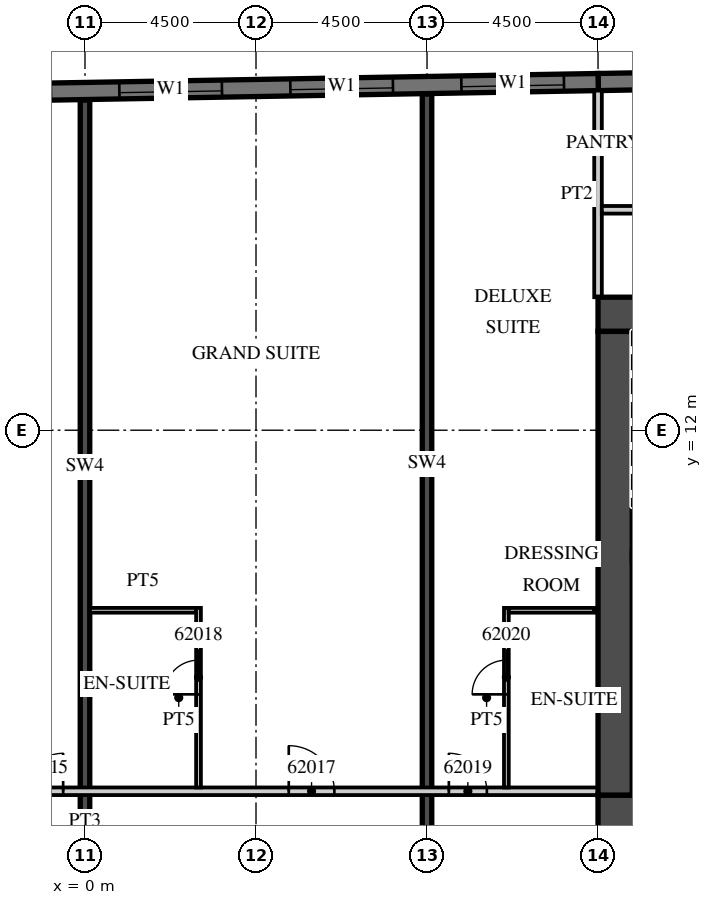
"""IFC4 building model, lengths in metres.
Left out: names, types, materials, properties, quantities, classifications, styles, units other than length and angle.
Written with IfcOpenShell. Run it as: python <this file> out.ifc"""

import sys

from ifc_helpers import new_model, si_unit, direction, frame, frame_2d, origin, place, context, subcontext, project, spatial, rectangle, extrude, element, fill, save


model = new_model("IFC4")
c1 = context("Model", 3, precision=1e-05, world=origin(), true_north=direction((0.0, 1.0)))
c2 = subcontext(c1, "Body", "Model", "MODEL_VIEW")
j1 = project(units=[si_unit("LENGTHUNIT", "METRE"), si_unit("PLANEANGLEUNIT", "RADIAN")], contexts=[c1])
p1 = place(None, origin())
s1 = spatial("IfcSite", under=j1, at=p1, CompositionType="ELEMENT")
p2 = place(p1, origin())
s2 = spatial("IfcBuilding", under=s1, at=p2, CompositionType="ELEMENT")
p3 = place(p2, frame((0.0, 0.0, 250.7)))
s3 = spatial("IfcBuildingStorey", under=s2, at=p3, CompositionType="ELEMENT", Elevation=250.7)
p4 = place(p3, frame((0.0, 1.4, 0.0), z_axis=(0.0, 0.0, 1.0), x_axis=(0.0, 1.0, 0.0)))
e1 = element("IfcWall", 1, at=p4, inside=s3, PredefinedType="SHEAR", context=c2, shape_type="SweptSolid", body=[
    extrude(rectangle(XDim=19.289, YDim=0.25, at=frame_2d((9.644, 0.0))), origin(), (0.0, 0.0, 1.0), 3.3),
])
p5 = place(p3, frame((9.0, 1.4, 0.0), z_axis=(0.0, 0.0, 1.0), x_axis=(0.0, 1.0, 0.0)))
e2 = element("IfcWall", 2, at=p5, inside=s3, PredefinedType="SHEAR", context=c2, shape_type="SweptSolid", body=[
    extrude(rectangle(XDim=19.446, YDim=0.25, at=frame_2d((9.723, 0.0))), origin(), (0.0, 0.0, 1.0), 3.3),
])
p6 = place(p3, frame((31.504, 21.476, 0.0), z_axis=(0.0, 0.0, 1.0), x_axis=(-0.999847677887, -0.017453395744, 0.0)))
e3 = element("IfcWall", 3, at=p6, inside=s3, PredefinedType="SOLIDWALL", context=c2, shape_type="SweptSolid", body=[
    extrude(rectangle(XDim=18.003, YDim=0.45, at=frame_2d((9.001, 0.0))), origin(), (0.0, 0.0, 1.0), 3.02),
])
p7 = place(p3, frame((13.504, 21.161, 0.0), z_axis=(0.0, 0.0, 1.0), x_axis=(-0.999847763257, -0.017448504532, 0.0)))
e4 = element("IfcWall", 4, at=p7, inside=s3, PredefinedType="SOLIDWALL", context=c2, shape_type="SweptSolid", body=[
    extrude(rectangle(XDim=46.859, YDim=0.45, at=frame_2d((23.43, 0.0))), origin(), (0.0, 0.0, 1.0), 3.02),
])
p8 = place(p7, frame((0.9, 0.0, 0.45)))
e5 = element("IfcOpeningElement", 5, at=p8, cuts=e4, PredefinedType="OPENING", context=c2, shape_type="SweptSolid", body=[
    extrude(rectangle(XDim=2.7, YDim=2.25, at=frame_2d((1.35, 1.125))), frame((0.0, 0.235, 0.0), z_axis=(0.0, -1.0, 0.0), x_axis=(1.0, 0.0, 0.0)), (0.0, 0.0, 1.0), 0.47),
])
p9 = place(p7, frame((5.401, 0.0, 0.45)))
e6 = element("IfcOpeningElement", 6, at=p9, cuts=e4, PredefinedType="OPENING", context=c2, shape_type="SweptSolid", body=[
    extrude(rectangle(XDim=2.7, YDim=2.25, at=frame_2d((1.35, 1.125))), frame((0.0, 0.235, 0.0), z_axis=(0.0, -1.0, 0.0), x_axis=(1.0, 0.0, 0.0)), (0.0, 0.0, 1.0), 0.47),
])
p10 = place(p7, frame((9.902, 0.0, 0.45)))
e7 = element("IfcOpeningElement", 7, at=p10, cuts=e4, PredefinedType="OPENING", context=c2, shape_type="SweptSolid", body=[
    extrude(rectangle(XDim=2.7, YDim=2.25, at=frame_2d((1.35, 1.125))), frame((0.0, 0.235, 0.0), z_axis=(0.0, -1.0, 0.0), x_axis=(1.0, 0.0, 0.0)), (0.0, 0.0, 1.0), 0.47),
])
p11 = place(p7, frame((14.402, 0.0, 0.45)))
e8 = element("IfcOpeningElement", 8, at=p11, cuts=e4, PredefinedType="OPENING", context=c2, shape_type="SweptSolid", body=[
    extrude(rectangle(XDim=2.7, YDim=2.25, at=frame_2d((1.35, 1.125))), frame((0.0, 0.235, 0.0), z_axis=(0.0, -1.0, 0.0), x_axis=(1.0, 0.0, 0.0)), (0.0, 0.0, 1.0), 0.47),
])
p12 = place(p7, frame((18.903, 0.0, 0.45)))
e9 = element("IfcOpeningElement", 9, at=p12, cuts=e4, PredefinedType="OPENING", context=c2, shape_type="SweptSolid", body=[
    extrude(rectangle(XDim=2.7, YDim=2.25, at=frame_2d((1.35, 1.125))), frame((0.0, 0.235, 0.0), z_axis=(0.0, -1.0, 0.0), x_axis=(1.0, 0.0, 0.0)), (0.0, 0.0, 1.0), 0.47),
])
p13 = place(p7, frame((23.404, 0.0, 0.45)))
e10 = element("IfcOpeningElement", 10, at=p13, cuts=e4, PredefinedType="OPENING", context=c2, shape_type="SweptSolid", body=[
    extrude(rectangle(XDim=2.7, YDim=2.25, at=frame_2d((1.35, 1.125))), frame((0.0, 0.235, 0.0), z_axis=(0.0, -1.0, 0.0), x_axis=(1.0, 0.0, 0.0)), (0.0, 0.0, 1.0), 0.47),
])
p14 = place(p7, frame((27.904, 0.0, 0.45)))
e11 = element("IfcOpeningElement", 11, at=p14, cuts=e4, PredefinedType="OPENING", context=c2, shape_type="SweptSolid", body=[
    extrude(rectangle(XDim=2.7, YDim=2.25, at=frame_2d((1.35, 1.125))), frame((0.0, 0.235, 0.0), z_axis=(0.0, -1.0, 0.0), x_axis=(1.0, 0.0, 0.0)), (0.0, 0.0, 1.0), 0.47),
])
p15 = place(p7, frame((32.405, 0.0, 0.45)))
e12 = element("IfcOpeningElement", 12, at=p15, cuts=e4, PredefinedType="OPENING", context=c2, shape_type="SweptSolid", body=[
    extrude(rectangle(XDim=2.7, YDim=2.25, at=frame_2d((1.35, 1.125))), frame((0.0, 0.235, 0.0), z_axis=(0.0, -1.0, 0.0), x_axis=(1.0, 0.0, 0.0)), (0.0, 0.0, 1.0), 0.47),
])
p16 = place(p7, frame((36.906, 0.0, 0.45)))
e13 = element("IfcOpeningElement", 13, at=p16, cuts=e4, PredefinedType="OPENING", context=c2, shape_type="SweptSolid", body=[
    extrude(rectangle(XDim=2.7, YDim=2.25, at=frame_2d((1.35, 1.125))), frame((0.0, 0.235, 0.0), z_axis=(0.0, -1.0, 0.0), x_axis=(1.0, 0.0, 0.0)), (0.0, 0.0, 1.0), 0.47),
])
p17 = place(p7, frame((41.406, 0.0, 0.45)))
e14 = element("IfcOpeningElement", 14, at=p17, cuts=e4, PredefinedType="OPENING", context=c2, shape_type="SweptSolid", body=[
    extrude(rectangle(XDim=2.7, YDim=2.25, at=frame_2d((1.35, 1.125))), frame((0.0, 0.235, 0.0), z_axis=(0.0, -1.0, 0.0), x_axis=(1.0, 0.0, 0.0)), (0.0, 0.0, 1.0), 0.47),
])
p18 = place(p3, frame((13.5, 15.5, 0.0), z_axis=(0.0, 0.0, 1.0), x_axis=(0.0, 1.0, 0.0)))
e15 = element("IfcWall", 15, at=p18, inside=s3, PredefinedType="PARTITIONING", context=c2, shape_type="SweptSolid", body=[
    extrude(rectangle(XDim=5.436, YDim=0.2, at=frame_2d((2.718, 0.0))), origin(), (0.0, 0.0, 1.0), 3.02),
])
p19 = place(p3, frame((-13.5, 2.5, 0.0), z_axis=(0.0, 0.0, 1.0), x_axis=(1.0, 0.0, 0.0)))
e16 = element("IfcWall", 16, at=p19, inside=s3, PredefinedType="PARTITIONING", context=c2, shape_type="SweptSolid", body=[
    extrude(rectangle(XDim=27.0, YDim=0.2, at=frame_2d((13.5, 0.0))), origin(), (0.0, 0.0, 1.0), 3.02),
])
p20 = place(p19, frame((0.575, 0.0, 0.0)))
e17 = element("IfcOpeningElement", 17, at=p20, cuts=e16, PredefinedType="OPENING", context=c2, shape_type="SweptSolid", body=[
    extrude(rectangle(XDim=1.0, YDim=2.1, at=frame_2d((0.5, 1.05))), frame((0.0, 0.11, 0.0), z_axis=(0.0, -1.0, 0.0), x_axis=(1.0, 0.0, 0.0)), (0.0, 0.0, 1.0), 0.22),
])
p21 = place(p19, frame((7.45, 0.0, 0.0)))
e18 = element("IfcOpeningElement", 18, at=p21, cuts=e16, PredefinedType="OPENING", context=c2, shape_type="SweptSolid", body=[
    extrude(rectangle(XDim=1.0, YDim=2.1, at=frame_2d((0.5, 1.05))), frame((0.0, 0.11, 0.0), z_axis=(0.0, -1.0, 0.0), x_axis=(1.0, 0.0, 0.0)), (0.0, 0.0, 1.0), 0.22),
])
p22 = place(p19, frame((11.925, 0.0, 0.0)))
e19 = element("IfcOpeningElement", 19, at=p22, cuts=e16, PredefinedType="OPENING", context=c2, shape_type="SweptSolid", body=[
    extrude(rectangle(XDim=1.0, YDim=2.1, at=frame_2d((0.5, 1.05))), frame((0.0, 0.11, 0.0), z_axis=(0.0, -1.0, 0.0), x_axis=(1.0, 0.0, 0.0)), (0.0, 0.0, 1.0), 0.22),
])
p23 = place(p19, frame((18.862, 0.0, 0.0)))
e20 = element("IfcOpeningElement", 20, at=p23, cuts=e16, PredefinedType="OPENING", context=c2, shape_type="SweptSolid", body=[
    extrude(rectangle(XDim=1.2, YDim=2.1, at=frame_2d((0.6, 1.05))), frame((0.0, 0.11, 0.0), z_axis=(0.0, -1.0, 0.0), x_axis=(1.0, 0.0, 0.0)), (0.0, 0.0, 1.0), 0.22),
])
p24 = place(p19, frame((23.075, 0.0, 0.0)))
e21 = element("IfcOpeningElement", 21, at=p24, cuts=e16, PredefinedType="OPENING", context=c2, shape_type="SweptSolid", body=[
    extrude(rectangle(XDim=1.0, YDim=2.1, at=frame_2d((0.5, 1.05))), frame((0.0, 0.11, 0.0), z_axis=(0.0, -1.0, 0.0), x_axis=(1.0, 0.0, 0.0)), (0.0, 0.0, 1.0), 0.22),
])
p25 = place(p3, frame((2.987, 2.6, 0.0), z_axis=(0.0, 0.0, 1.0), x_axis=(0.0, 1.0, 0.0)))
e22 = element("IfcWall", 22, at=p25, inside=s3, PredefinedType="PARTITIONING", context=c2, shape_type="SweptSolid", body=[
    extrude(rectangle(XDim=4.725, YDim=0.125, at=frame_2d((2.362, 0.0))), origin(), (0.0, 0.0, 1.0), 3.02),
])
p26 = place(p25, frame((2.45, 0.0, 0.0)))
e23 = element("IfcOpeningElement", 23, at=p26, cuts=e22, PredefinedType="OPENING", context=c2, shape_type="SweptSolid", body=[
    extrude(rectangle(XDim=0.9, YDim=2.1, at=frame_2d((0.45, 1.05))), frame((0.0, 0.073, 0.0), z_axis=(0.0, -1.0, 0.0), x_axis=(1.0, 0.0, 0.0)), (0.0, 0.0, 1.0), 0.145),
])
p27 = place(p3, frame((0.125, 7.262, 0.0), z_axis=(0.0, 0.0, 1.0), x_axis=(1.0, 0.0, 0.0)))
e24 = element("IfcWall", 24, at=p27, inside=s3, PredefinedType="PARTITIONING", context=c2, shape_type="SweptSolid", body=[
    extrude(rectangle(XDim=2.8, YDim=0.125, at=frame_2d((1.4, 0.0))), origin(), (0.0, 0.0, 1.0), 3.02),
])
p28 = place(p3, frame((11.088, 2.6, 0.0), z_axis=(0.0, 0.0, 1.0), x_axis=(0.0, 1.0, 0.0)))
e25 = element("IfcWall", 25, at=p28, inside=s3, PredefinedType="PARTITIONING", context=c2, shape_type="SweptSolid", body=[
    extrude(rectangle(XDim=4.725, YDim=0.125, at=frame_2d((2.362, 0.0))), origin(), (0.0, 0.0, 1.0), 3.02),
])
p29 = place(p28, frame((2.45, 0.0, 0.0)))
e26 = element("IfcOpeningElement", 26, at=p29, cuts=e25, PredefinedType="OPENING", context=c2, shape_type="SweptSolid", body=[
    extrude(rectangle(XDim=0.9, YDim=2.1, at=frame_2d((0.45, 1.05))), frame((0.0, 0.073, 0.0), z_axis=(0.0, -1.0, 0.0), x_axis=(1.0, 0.0, 0.0)), (0.0, 0.0, 1.0), 0.145),
])
p30 = place(p3, frame((11.15, 7.262, 0.0), z_axis=(0.0, 0.0, 1.0), x_axis=(1.0, 0.0, 0.0)))
e27 = element("IfcWall", 27, at=p30, inside=s3, PredefinedType="PARTITIONING", context=c2, shape_type="SweptSolid", body=[
    extrude(rectangle(XDim=2.25, YDim=0.125, at=frame_2d((1.125, 0.0))), origin(), (0.0, 0.0, 1.0), 3.02),
])
p31 = place(p3, frame((13.5, 1.95, 0.0), z_axis=(0.0, 0.0, 1.0), x_axis=(1.0, 0.0, 0.0)))
e28 = element("IfcWall", 28, at=p31, inside=s3, PredefinedType="SHEAR", context=c2, shape_type="SweptSolid", body=[
    extrude(rectangle(XDim=18.0, YDim=0.9, at=frame_2d((9.0, 0.0))), origin(), (0.0, 0.0, 1.0), 3.02),
])
p32 = place(p31, frame((1.475, 0.0, 0.0)))
e29 = element("IfcOpeningElement", 29, at=p32, cuts=e28, PredefinedType="OPENING", context=c2, shape_type="SweptSolid", body=[
    extrude(rectangle(XDim=1.8, YDim=2.1, at=frame_2d((0.9, 1.05))), frame((0.0, 0.46, 0.0), z_axis=(0.0, -1.0, 0.0), x_axis=(1.0, 0.0, 0.0)), (0.0, 0.0, 1.0), 0.92),
])
p33 = place(p3, frame((13.5, 15.05, 0.0), z_axis=(0.0, 0.0, 1.0), x_axis=(1.0, 0.0, 0.0)))
e30 = element("IfcWall", 30, at=p33, inside=s3, PredefinedType="SHEAR", context=c2, shape_type="SweptSolid", body=[
    extrude(rectangle(XDim=6.8, YDim=0.9, at=frame_2d((3.4, 0.0))), origin(), (0.0, 0.0, 1.0), 3.02),
])
p34 = place(p33, frame((4.725, 0.0, 0.0)))
e31 = element("IfcOpeningElement", 31, at=p34, cuts=e30, PredefinedType="OPENING", context=c2, shape_type="SweptSolid", body=[
    extrude(rectangle(XDim=1.2, YDim=2.1, at=frame_2d((0.6, 1.05))), frame((0.0, 0.46, 0.0), z_axis=(0.0, -1.0, 0.0), x_axis=(1.0, 0.0, 0.0)), (0.0, 0.0, 1.0), 0.92),
])
p35 = place(p3, frame((13.95, 2.4, 0.0), z_axis=(0.0, 0.0, 1.0), x_axis=(0.0, 1.0, 0.0)))
e32 = element("IfcWall", 32, at=p35, inside=s3, PredefinedType="SHEAR", context=c2, shape_type="SweptSolid", body=[
    extrude(rectangle(XDim=12.2, YDim=0.9, at=frame_2d((6.1, 0.0))), origin(), (0.0, 0.0, 1.0), 3.02),
])
p36 = place(p3, frame((13.6, 17.8, 0.0), z_axis=(0.0, 0.0, 1.0), x_axis=(1.0, 0.0, 0.0)))
e33 = element("IfcWall", 33, at=p36, inside=s3, PredefinedType="PARTITIONING", context=c2, shape_type="SweptSolid", body=[
    extrude(rectangle(XDim=28.657, YDim=0.2, at=frame_2d((14.329, 0.0))), origin(), (0.0, 0.0, 1.0), 3.02),
])
p37 = place(p36, frame((15.012, 0.0, 0.0)))
e34 = element("IfcOpeningElement", 34, at=p37, cuts=e33, PredefinedType="OPENING", context=c2, shape_type="SweptSolid", body=[
    extrude(rectangle(XDim=0.9, YDim=2.1, at=frame_2d((0.45, 1.05))), frame((0.0, 0.11, 0.0), z_axis=(0.0, -1.0, 0.0), x_axis=(1.0, 0.0, 0.0)), (0.0, 0.0, 1.0), 0.22),
])
p38 = place(p36, frame((6.712, 0.0, 0.0)))
e35 = element("IfcOpeningElement", 35, at=p38, cuts=e33, PredefinedType="OPENING", context=c2, shape_type="SweptSolid", body=[
    extrude(rectangle(XDim=0.9, YDim=2.1, at=frame_2d((0.45, 1.05))), frame((0.0, 0.11, 0.0), z_axis=(0.0, -1.0, 0.0), x_axis=(1.0, 0.0, 0.0)), (0.0, 0.0, 1.0), 0.22),
])
p39 = place(p8, origin())
e36 = element("IfcWindow", 36, at=p39, inside=s3, PartitioningType="SINGLE_PANEL", PredefinedType="WINDOW", context=c2, shape_type="SweptSolid", body=[
    extrude(rectangle(XDim=2.7, YDim=2.25, at=frame_2d((1.35, 1.125))), frame((0.0, 0.09, 0.0), z_axis=(0.0, -1.0, 0.0), x_axis=(1.0, 0.0, 0.0)), (0.0, 0.0, 1.0), 0.06),
])
fill(e5, e36)
p40 = place(p9, origin())
e37 = element("IfcWindow", 37, at=p40, inside=s3, PartitioningType="SINGLE_PANEL", PredefinedType="WINDOW", context=c2, shape_type="SweptSolid", body=[
    extrude(rectangle(XDim=2.7, YDim=2.25, at=frame_2d((1.35, 1.125))), frame((0.0, 0.09, 0.0), z_axis=(0.0, -1.0, 0.0), x_axis=(1.0, 0.0, 0.0)), (0.0, 0.0, 1.0), 0.06),
])
fill(e6, e37)
p41 = place(p10, origin())
e38 = element("IfcWindow", 38, at=p41, inside=s3, PartitioningType="SINGLE_PANEL", PredefinedType="WINDOW", context=c2, shape_type="SweptSolid", body=[
    extrude(rectangle(XDim=2.7, YDim=2.25, at=frame_2d((1.35, 1.125))), frame((0.0, 0.09, 0.0), z_axis=(0.0, -1.0, 0.0), x_axis=(1.0, 0.0, 0.0)), (0.0, 0.0, 1.0), 0.06),
])
fill(e7, e38)
p42 = place(p22, origin())
e39 = element("IfcDoor", 39, at=p42, inside=s3, OperationType="SINGLE_SWING_RIGHT", PredefinedType="DOOR", context=c2, shape_type="SweptSolid", body=[
    extrude(rectangle(XDim=1.0, YDim=2.1, at=frame_2d((0.5, 1.05))), frame((0.0, 0.025, 0.0), z_axis=(0.0, -1.0, 0.0), x_axis=(1.0, 0.0, 0.0)), (0.0, 0.0, 1.0), 0.05),
])
fill(e19, e39)
p43 = place(p23, origin())
e40 = element("IfcDoor", 40, at=p43, inside=s3, OperationType="SINGLE_SWING_LEFT", PredefinedType="DOOR", context=c2, shape_type="SweptSolid", body=[
    extrude(rectangle(XDim=1.2, YDim=2.1, at=frame_2d((0.6, 1.05))), frame((0.0, 0.025, 0.0), z_axis=(0.0, -1.0, 0.0), x_axis=(1.0, 0.0, 0.0)), (0.0, 0.0, 1.0), 0.05),
])
fill(e20, e40)
p44 = place(p26, origin())
e41 = element("IfcDoor", 41, at=p44, inside=s3, OperationType="SINGLE_SWING_LEFT", PredefinedType="DOOR", context=c2, shape_type="SweptSolid", body=[
    extrude(rectangle(XDim=0.9, YDim=2.1, at=frame_2d((0.45, 1.05))), frame((0.0, 0.025, 0.0), z_axis=(0.0, -1.0, 0.0), x_axis=(1.0, 0.0, 0.0)), (0.0, 0.0, 1.0), 0.05),
])
fill(e23, e41)
p45 = place(p24, origin())
e42 = element("IfcDoor", 42, at=p45, inside=s3, OperationType="SINGLE_SWING_LEFT", PredefinedType="DOOR", context=c2, shape_type="SweptSolid", body=[
    extrude(rectangle(XDim=1.0, YDim=2.1, at=frame_2d((0.5, 1.05))), frame((0.0, 0.025, 0.0), z_axis=(0.0, -1.0, 0.0), x_axis=(1.0, 0.0, 0.0)), (0.0, 0.0, 1.0), 0.05),
])
fill(e21, e42)
p46 = place(p29, origin())
e43 = element("IfcDoor", 43, at=p46, inside=s3, OperationType="SINGLE_SWING_LEFT", PredefinedType="DOOR", context=c2, shape_type="SweptSolid", body=[
    extrude(rectangle(XDim=0.9, YDim=2.1, at=frame_2d((0.45, 1.05))), frame((0.0, 0.025, 0.0), z_axis=(0.0, -1.0, 0.0), x_axis=(1.0, 0.0, 0.0)), (0.0, 0.0, 1.0), 0.05),
])
fill(e26, e43)
save(model, sys.argv[1])
